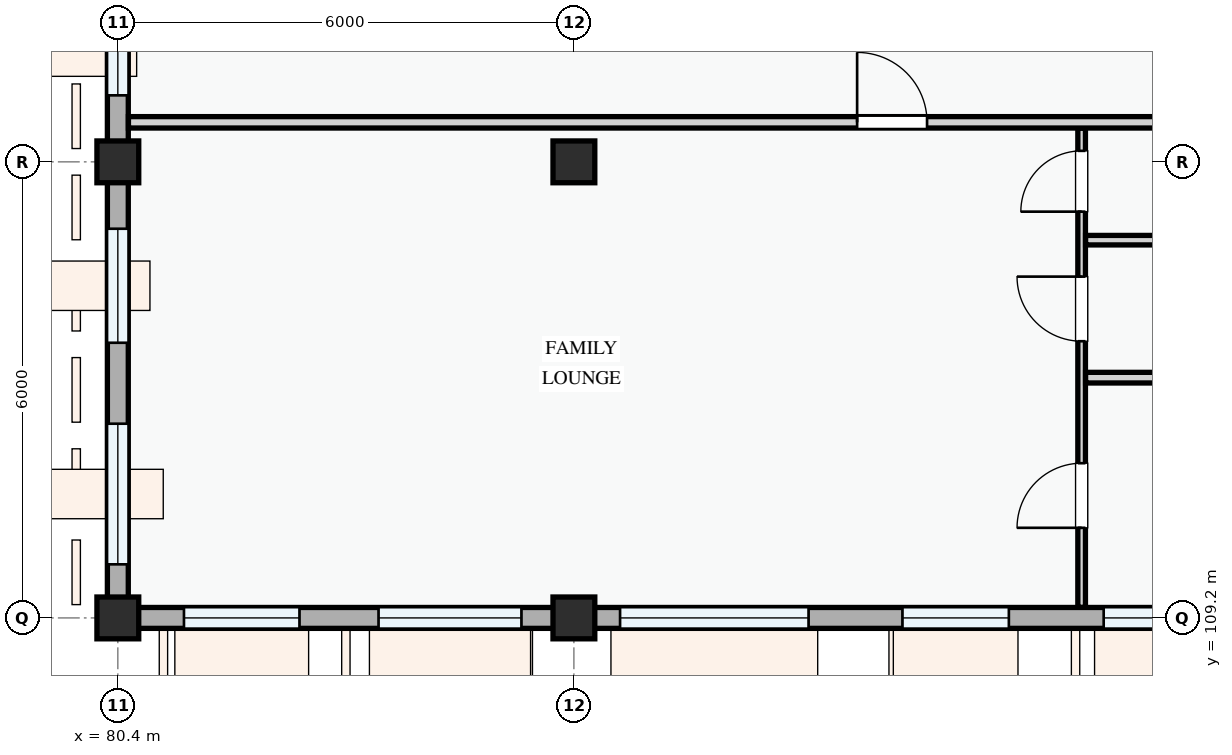
"""IFC4 building model, lengths in metres.
Left out: names, types, materials, properties, quantities, classifications, styles, units other than length and angle.
Written with IfcOpenShell. Run it as: python <this file> out.ifc"""

import sys

from ifc_helpers import new_model, si_unit, direction, frame, frame_2d, origin, origin_2d, place, context, subcontext, project, spatial, rectangle, extrude, element, fill, save


model = new_model("IFC4")
c1 = context("Model", 3, precision=1e-05, world=origin(), true_north=direction((0.0, 1.0)))
c2 = subcontext(c1, "Body", "Model", "MODEL_VIEW")
j1 = project(units=[si_unit("LENGTHUNIT", "METRE"), si_unit("PLANEANGLEUNIT", "RADIAN")], contexts=[c1])
p1 = place(None, origin())
s1 = spatial("IfcSite", under=j1, at=p1, CompositionType="ELEMENT")
p2 = place(p1, origin())
s2 = spatial("IfcBuilding", under=s1, at=p2, CompositionType="ELEMENT")
p3 = place(p2, frame((0.0, 0.0, 27.9)))
s3 = spatial("IfcBuildingStorey", under=s2, at=p3, CompositionType="ELEMENT", Elevation=27.9)
for number, where, z_axis, x_axis in (
    (1, (80.4, 109.2, 0.0), (0.0, 0.0, 1.0), (1.0, 0.0, 0.0)),
    (2, (80.4, 115.2, 0.0), (0.0, 0.0, 1.0), (1.0, 0.0, 0.0)),
    (3, (86.4, 109.2, 0.0), (0.0, 0.0, 1.0), (1.0, 0.0, 0.0)),
    (4, (86.4, 115.2, 0.0), (0.0, 0.0, 1.0), (1.0, 0.0, 0.0)),
):
    element("IfcColumn", number, at=place(p3, frame(where, z_axis=z_axis, x_axis=x_axis)), inside=s3, PredefinedType="COLUMN", context=c2, shape_type="SweptSolid", body=[
        extrude(rectangle(XDim=0.55, YDim=0.55, at=origin_2d()), origin(), (0.0, 0.0, 1.0), 3.3),
    ])
p4 = place(p3, frame((80.4, 123.6, 0.0), z_axis=(0.0, 0.0, 1.0), x_axis=(0.0, -1.0, 0.0)))
e5 = element("IfcWall", 5, at=p4, inside=s3, PredefinedType="STANDARD", context=c2, shape_type="SweptSolid", body=[
    extrude(rectangle(XDim=8.4, YDim=0.275, at=frame_2d((4.2, 0.0))), origin(), (0.0, 0.0, 1.0), 2.425),
])
p5 = place(p4, frame((0.583, 0.0, 0.78)))
e6 = element("IfcOpeningElement", 6, at=p5, cuts=e5, PredefinedType="OPENING", context=c2, shape_type="SweptSolid", body=[
    extrude(rectangle(XDim=2.2, YDim=1.5, at=frame_2d((1.1, 0.75))), frame((0.0, 0.147, 0.0), z_axis=(0.0, -1.0, 0.0), x_axis=(1.0, 0.0, 0.0)), (0.0, 0.0, 1.0), 0.295),
])
p6 = place(p4, frame((3.837, 0.0, 0.78)))
e7 = element("IfcOpeningElement", 7, at=p6, cuts=e5, PredefinedType="OPENING", context=c2, shape_type="SweptSolid", body=[
    extrude(rectangle(XDim=1.38, YDim=1.48, at=frame_2d((0.69, 0.74))), frame((0.0, 0.147, 0.0), z_axis=(0.0, -1.0, 0.0), x_axis=(1.0, 0.0, 0.0)), (0.0, 0.0, 1.0), 0.295),
])
p7 = place(p4, frame((6.375, 0.0, 0.78)))
e8 = element("IfcOpeningElement", 8, at=p7, cuts=e5, PredefinedType="OPENING", context=c2, shape_type="SweptSolid", body=[
    extrude(rectangle(XDim=1.15, YDim=1.25, at=frame_2d((0.575, 0.625))), frame((0.0, 0.147, 0.0), z_axis=(0.0, -1.0, 0.0), x_axis=(1.0, 0.0, 0.0)), (0.0, 0.0, 1.0), 0.295),
])
p8 = place(p3, frame((80.4, 115.2, 0.0), z_axis=(0.0, 0.0, 1.0), x_axis=(0.0, -1.0, 0.0)))
e9 = element("IfcWall", 9, at=p8, inside=s3, PredefinedType="STANDARD", context=c2, shape_type="SweptSolid", body=[
    extrude(rectangle(XDim=6.0, YDim=0.275, at=frame_2d((3.0, 0.0))), origin(), (0.0, 0.0, 1.0), 2.575),
])
p9 = place(p8, frame((0.88, 0.0, 0.78)))
e10 = element("IfcOpeningElement", 10, at=p9, cuts=e9, PredefinedType="OPENING", context=c2, shape_type="SweptSolid", body=[
    extrude(rectangle(XDim=1.5, YDim=1.65, at=frame_2d((0.75, 0.825))), frame((0.0, 0.147, 0.0), z_axis=(0.0, -1.0, 0.0), x_axis=(1.0, 0.0, 0.0)), (0.0, 0.0, 1.0), 0.295),
])
p10 = place(p8, frame((3.445, 0.0, 0.78)))
e11 = element("IfcOpeningElement", 11, at=p10, cuts=e9, PredefinedType="OPENING", context=c2, shape_type="SweptSolid", body=[
    extrude(rectangle(XDim=1.85, YDim=1.6, at=frame_2d((0.925, 0.8))), frame((0.0, 0.147, 0.0), z_axis=(0.0, -1.0, 0.0), x_axis=(1.0, 0.0, 0.0)), (0.0, 0.0, 1.0), 0.295),
])
p11 = place(p3, frame((80.4, 109.2, 0.0), z_axis=(0.0, 0.0, 1.0), x_axis=(1.0, 0.0, 0.0)))
e12 = element("IfcWall", 12, at=p11, inside=s3, PredefinedType="STANDARD", context=c2, shape_type="SweptSolid", body=[
    extrude(rectangle(XDim=6.0, YDim=0.275, at=frame_2d((3.0, 0.0))), origin(), (0.0, 0.0, 1.0), 2.475),
])
p12 = place(p11, frame((0.87, 0.0, 0.78)))
e13 = element("IfcOpeningElement", 13, at=p12, cuts=e12, PredefinedType="OPENING", context=c2, shape_type="SweptSolid", body=[
    extrude(rectangle(XDim=1.52, YDim=1.42, at=frame_2d((0.76, 0.71))), frame((0.0, 0.147, 0.0), z_axis=(0.0, -1.0, 0.0), x_axis=(1.0, 0.0, 0.0)), (0.0, 0.0, 1.0), 0.295),
])
p13 = place(p11, frame((3.43, 0.0, 0.78)))
e14 = element("IfcOpeningElement", 14, at=p13, cuts=e12, PredefinedType="OPENING", context=c2, shape_type="SweptSolid", body=[
    extrude(rectangle(XDim=1.88, YDim=1.52, at=frame_2d((0.94, 0.76))), frame((0.0, 0.147, 0.0), z_axis=(0.0, -1.0, 0.0), x_axis=(1.0, 0.0, 0.0)), (0.0, 0.0, 1.0), 0.295),
])
p14 = place(p3, frame((86.4, 109.2, 0.0), z_axis=(0.0, 0.0, 1.0), x_axis=(1.0, 0.0, 0.0)))
e15 = element("IfcWall", 15, at=p14, inside=s3, PredefinedType="STANDARD", context=c2, shape_type="SweptSolid", body=[
    extrude(rectangle(XDim=8.4, YDim=0.275, at=frame_2d((4.2, 0.0))), origin(), (0.0, 0.0, 1.0), 2.375),
])
p15 = place(p14, frame((0.607, 0.0, 0.78)))
e16 = element("IfcOpeningElement", 16, at=p15, cuts=e15, PredefinedType="OPENING", context=c2, shape_type="SweptSolid", body=[
    extrude(rectangle(XDim=2.48, YDim=1.46, at=frame_2d((1.24, 0.73))), frame((0.0, 0.147, 0.0), z_axis=(0.0, -1.0, 0.0), x_axis=(1.0, 0.0, 0.0)), (0.0, 0.0, 1.0), 0.295),
])
p16 = place(p14, frame((4.323, 0.0, 0.78)))
e17 = element("IfcOpeningElement", 17, at=p16, cuts=e15, PredefinedType="OPENING", context=c2, shape_type="SweptSolid", body=[
    extrude(rectangle(XDim=1.4, YDim=1.45, at=frame_2d((0.7, 0.725))), frame((0.0, 0.147, 0.0), z_axis=(0.0, -1.0, 0.0), x_axis=(1.0, 0.0, 0.0)), (0.0, 0.0, 1.0), 0.295),
])
p17 = place(p14, frame((6.97, 0.0, 0.78)))
e18 = element("IfcOpeningElement", 18, at=p17, cuts=e15, PredefinedType="OPENING", context=c2, shape_type="SweptSolid", body=[
    extrude(rectangle(XDim=0.95, YDim=1.15, at=frame_2d((0.475, 0.575))), frame((0.0, 0.147, 0.0), z_axis=(0.0, -1.0, 0.0), x_axis=(1.0, 0.0, 0.0)), (0.0, 0.0, 1.0), 0.295),
])
p18 = place(p3, frame((93.08, 109.34, 0.0), z_axis=(0.0, 0.0, 1.0), x_axis=(0.0, 1.0, 0.0)))
e19 = element("IfcWall", 19, at=p18, inside=s3, PredefinedType="PARTITIONING", context=c2, shape_type="SweptSolid", body=[
    extrude(rectangle(XDim=6.303, YDim=0.1, at=frame_2d((3.152, 0.0))), origin(), (0.0, 0.0, 1.0), 3.0),
])
p19 = place(p18, frame((1.046, 0.0, 0.0)))
e20 = element("IfcOpeningElement", 20, at=p19, cuts=e19, PredefinedType="OPENING", context=c2, shape_type="SweptSolid", body=[
    extrude(rectangle(XDim=0.85, YDim=2.1, at=frame_2d((0.425, 1.05))), frame((0.0, 0.06, 0.0), z_axis=(0.0, -1.0, 0.0), x_axis=(1.0, 0.0, 0.0)), (0.0, 0.0, 1.0), 0.12),
])
p20 = place(p18, frame((3.501, 0.0, 0.0)))
e21 = element("IfcOpeningElement", 21, at=p20, cuts=e19, PredefinedType="OPENING", context=c2, shape_type="SweptSolid", body=[
    extrude(rectangle(XDim=0.85, YDim=2.1, at=frame_2d((0.425, 1.05))), frame((0.0, 0.06, 0.0), z_axis=(0.0, -1.0, 0.0), x_axis=(1.0, 0.0, 0.0)), (0.0, 0.0, 1.0), 0.12),
])
p21 = place(p18, frame((5.205, 0.0, 0.0)))
e22 = element("IfcOpeningElement", 22, at=p21, cuts=e19, PredefinedType="OPENING", context=c2, shape_type="SweptSolid", body=[
    extrude(rectangle(XDim=0.8, YDim=2.1, at=frame_2d((0.4, 1.05))), frame((0.0, 0.06, 0.0), z_axis=(0.0, -1.0, 0.0), x_axis=(1.0, 0.0, 0.0)), (0.0, 0.0, 1.0), 0.12),
])
p22 = place(p3, frame((93.132, 112.361, 0.0), z_axis=(0.0, 0.0, 1.0), x_axis=(1.0, 0.0, 0.0)))
e23 = element("IfcWall", 23, at=p22, inside=s3, PredefinedType="PARTITIONING", context=c2, shape_type="SweptSolid", body=[
    extrude(rectangle(XDim=13.666, YDim=0.14, at=frame_2d((6.833, 0.0))), origin(), (0.0, 0.0, 1.0), 3.0),
])
p23 = place(p3, frame((93.132, 114.17, 0.0), z_axis=(0.0, 0.0, 1.0), x_axis=(1.0, 0.0, 0.0)))
e24 = element("IfcWall", 24, at=p23, inside=s3, PredefinedType="PARTITIONING", context=c2, shape_type="SweptSolid", body=[
    extrude(rectangle(XDim=13.666, YDim=0.125, at=frame_2d((6.833, 0.0))), origin(), (0.0, 0.0, 1.0), 3.0),
])
p24 = place(p3, frame((80.54, 115.72, 0.0), z_axis=(0.0, 0.0, 1.0), x_axis=(1.0, 0.0, 0.0)))
e25 = element("IfcWall", 25, at=p24, inside=s3, PredefinedType="PARTITIONING", context=c2, shape_type="SweptSolid", body=[
    extrude(rectangle(XDim=69.51, YDim=0.15, at=frame_2d((34.755, 0.0))), origin(), (0.0, 0.0, 1.0), 3.0),
])
p25 = place(p24, frame((9.587, 0.0, 0.0)))
e26 = element("IfcOpeningElement", 26, at=p25, cuts=e25, PredefinedType="OPENING", context=c2, shape_type="SweptSolid", body=[
    extrude(rectangle(XDim=0.92, YDim=2.1, at=frame_2d((0.46, 1.05))), frame((0.0, 0.085, 0.0), z_axis=(0.0, -1.0, 0.0), x_axis=(1.0, 0.0, 0.0)), (0.0, 0.0, 1.0), 0.17),
])
p26 = place(p24, frame((37.68, 0.0, 0.0)))
e27 = element("IfcOpeningElement", 27, at=p26, cuts=e25, PredefinedType="OPENING", context=c2, shape_type="SweptSolid", body=[
    extrude(rectangle(XDim=0.92, YDim=2.1, at=frame_2d((0.46, 1.05))), frame((0.0, 0.085, 0.0), z_axis=(0.0, -1.0, 0.0), x_axis=(1.0, 0.0, 0.0)), (0.0, 0.0, 1.0), 0.17),
])
p27 = place(p24, frame((52.856, 0.0, 0.0)))
e28 = element("IfcOpeningElement", 28, at=p27, cuts=e25, PredefinedType="OPENING", context=c2, shape_type="SweptSolid", body=[
    extrude(rectangle(XDim=0.92, YDim=2.1, at=frame_2d((0.46, 1.05))), frame((0.0, 0.085, 0.0), z_axis=(0.0, -1.0, 0.0), x_axis=(1.0, 0.0, 0.0)), (0.0, 0.0, 1.0), 0.17),
])
p28 = place(p7, origin())
e29 = element("IfcWindow", 29, at=p28, inside=s3, PartitioningType="SINGLE_PANEL", PredefinedType="WINDOW", context=c2, shape_type="SweptSolid", body=[
    extrude(rectangle(XDim=1.15, YDim=1.25, at=frame_2d((0.575, 0.625))), frame((0.0, 0.03, 0.0), z_axis=(0.0, -1.0, 0.0), x_axis=(1.0, 0.0, 0.0)), (0.0, 0.0, 1.0), 0.06),
])
fill(e8, e29)
p29 = place(p9, origin())
e30 = element("IfcWindow", 30, at=p29, inside=s3, PartitioningType="SINGLE_PANEL", PredefinedType="WINDOW", context=c2, shape_type="SweptSolid", body=[
    extrude(rectangle(XDim=1.5, YDim=1.65, at=frame_2d((0.75, 0.825))), frame((0.0, 0.03, 0.0), z_axis=(0.0, -1.0, 0.0), x_axis=(1.0, 0.0, 0.0)), (0.0, 0.0, 1.0), 0.06),
])
fill(e10, e30)
p30 = place(p10, origin())
e31 = element("IfcWindow", 31, at=p30, inside=s3, PartitioningType="DOUBLE_PANEL_VERTICAL", PredefinedType="WINDOW", context=c2, shape_type="SweptSolid", body=[
    extrude(rectangle(XDim=1.85, YDim=1.6, at=frame_2d((0.925, 0.8))), frame((0.0, 0.03, 0.0), z_axis=(0.0, -1.0, 0.0), x_axis=(1.0, 0.0, 0.0)), (0.0, 0.0, 1.0), 0.06),
])
fill(e11, e31)
p31 = place(p12, origin())
e32 = element("IfcWindow", 32, at=p31, inside=s3, PartitioningType="SINGLE_PANEL", PredefinedType="WINDOW", context=c2, shape_type="SweptSolid", body=[
    extrude(rectangle(XDim=1.52, YDim=1.42, at=frame_2d((0.76, 0.71))), frame((0.0, 0.03, 0.0), z_axis=(0.0, -1.0, 0.0), x_axis=(1.0, 0.0, 0.0)), (0.0, 0.0, 1.0), 0.06),
])
fill(e13, e32)
p32 = place(p13, origin())
e33 = element("IfcWindow", 33, at=p32, inside=s3, PartitioningType="DOUBLE_PANEL_VERTICAL", PredefinedType="WINDOW", context=c2, shape_type="SweptSolid", body=[
    extrude(rectangle(XDim=1.88, YDim=1.52, at=frame_2d((0.94, 0.76))), frame((0.0, 0.03, 0.0), z_axis=(0.0, -1.0, 0.0), x_axis=(1.0, 0.0, 0.0)), (0.0, 0.0, 1.0), 0.06),
])
fill(e14, e33)
p33 = place(p15, origin())
e34 = element("IfcWindow", 34, at=p33, inside=s3, PartitioningType="DOUBLE_PANEL_VERTICAL", PredefinedType="WINDOW", context=c2, shape_type="SweptSolid", body=[
    extrude(rectangle(XDim=2.48, YDim=1.46, at=frame_2d((1.24, 0.73))), frame((0.0, 0.03, 0.0), z_axis=(0.0, -1.0, 0.0), x_axis=(1.0, 0.0, 0.0)), (0.0, 0.0, 1.0), 0.06),
])
fill(e16, e34)
p34 = place(p16, origin())
e35 = element("IfcWindow", 35, at=p34, inside=s3, PartitioningType="SINGLE_PANEL", PredefinedType="WINDOW", context=c2, shape_type="SweptSolid", body=[
    extrude(rectangle(XDim=1.4, YDim=1.45, at=frame_2d((0.7, 0.725))), frame((0.0, 0.03, 0.0), z_axis=(0.0, -1.0, 0.0), x_axis=(1.0, 0.0, 0.0)), (0.0, 0.0, 1.0), 0.06),
])
fill(e17, e35)
p35 = place(p17, origin())
e36 = element("IfcWindow", 36, at=p35, inside=s3, PartitioningType="SINGLE_PANEL", PredefinedType="WINDOW", context=c2, shape_type="SweptSolid", body=[
    extrude(rectangle(XDim=0.95, YDim=1.15, at=frame_2d((0.475, 0.575))), frame((0.0, 0.03, 0.0), z_axis=(0.0, -1.0, 0.0), x_axis=(1.0, 0.0, 0.0)), (0.0, 0.0, 1.0), 0.06),
])
fill(e18, e36)
p36 = place(p19, origin())
e37 = element("IfcDoor", 37, at=p36, inside=s3, OperationType="SINGLE_SWING_LEFT", PredefinedType="DOOR", context=c2, shape_type="SweptSolid", body=[
    extrude(rectangle(XDim=0.85, YDim=2.1, at=frame_2d((0.425, 1.05))), frame((0.0, 0.025, 0.0), z_axis=(0.0, -1.0, 0.0), x_axis=(1.0, 0.0, 0.0)), (0.0, 0.0, 1.0), 0.05),
])
fill(e20, e37)
p37 = place(p20, origin())
e38 = element("IfcDoor", 38, at=p37, inside=s3, OperationType="SINGLE_SWING_RIGHT", PredefinedType="DOOR", context=c2, shape_type="SweptSolid", body=[
    extrude(rectangle(XDim=0.85, YDim=2.1, at=frame_2d((0.425, 1.05))), frame((0.0, 0.025, 0.0), z_axis=(0.0, -1.0, 0.0), x_axis=(1.0, 0.0, 0.0)), (0.0, 0.0, 1.0), 0.05),
])
fill(e21, e38)
p38 = place(p21, origin())
e39 = element("IfcDoor", 39, at=p38, inside=s3, OperationType="SINGLE_SWING_LEFT", PredefinedType="DOOR", context=c2, shape_type="SweptSolid", body=[
    extrude(rectangle(XDim=0.8, YDim=2.1, at=frame_2d((0.4, 1.05))), frame((0.0, 0.025, 0.0), z_axis=(0.0, -1.0, 0.0), x_axis=(1.0, 0.0, 0.0)), (0.0, 0.0, 1.0), 0.05),
])
fill(e22, e39)
p39 = place(p25, origin())
e40 = element("IfcDoor", 40, at=p39, inside=s3, OperationType="SINGLE_SWING_LEFT", PredefinedType="DOOR", context=c2, shape_type="SweptSolid", body=[
    extrude(rectangle(XDim=0.92, YDim=2.1, at=frame_2d((0.46, 1.05))), frame((0.0, 0.025, 0.0), z_axis=(0.0, -1.0, 0.0), x_axis=(1.0, 0.0, 0.0)), (0.0, 0.0, 1.0), 0.05),
])
fill(e26, e40)
save(model, sys.argv[1])
